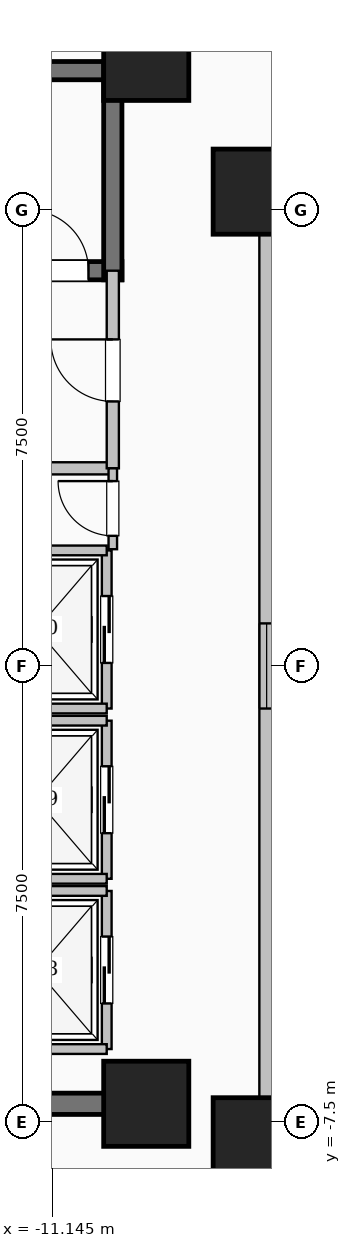
"""IFC4 building model, lengths in metres.
Left out: names, types, materials, properties, quantities, classifications, styles, units other than length and angle.
Written with IfcOpenShell. Run it as: python <this file> out.ifc"""

import sys

from ifc_helpers import new_model, si_unit, direction, frame, frame_2d, origin, origin_2d, place, context, subcontext, project, spatial, rectangle, extrude, element, fill, save


model = new_model("IFC4")
c1 = context("Model", 3, precision=1e-05, world=origin(), true_north=direction((0.0, 1.0)))
c2 = subcontext(c1, "Body", "Model", "MODEL_VIEW")
j1 = project(units=[si_unit("LENGTHUNIT", "METRE"), si_unit("PLANEANGLEUNIT", "RADIAN")], contexts=[c1])
p1 = place(None, origin())
s1 = spatial("IfcSite", under=j1, at=p1, CompositionType="ELEMENT")
p2 = place(p1, origin())
s2 = spatial("IfcBuilding", under=s1, at=p2, CompositionType="ELEMENT")
p3 = place(p2, frame((0.0, 0.0, 14.4)))
s3 = spatial("IfcBuildingStorey", under=s2, at=p3, CompositionType="ELEMENT", Elevation=14.4)
for number, where, z_axis, x_axis in (
    (1, (-7.8, -7.8, 0.0), (0.0, 0.0, 1.0), (1.0, 0.0, 0.0)),
    (2, (-7.8, 7.8, 0.0), (0.0, 0.0, 1.0), (1.0, 0.0, 0.0)),
    (3, (-9.6, -7.2, 0.0), (0.0, 0.0, 1.0), (1.0, 0.0, 0.0)),
    (4, (-9.6, 10.0, 0.0), (0.0, 0.0, 1.0), (1.0, 0.0, 0.0)),
):
    element("IfcColumn", number, at=place(p3, frame(where, z_axis=z_axis, x_axis=x_axis)), inside=s3, PredefinedType="COLUMN", context=c2, shape_type="SweptSolid", body=[
        extrude(rectangle(XDim=1.4, YDim=1.4, at=origin_2d()), origin(), (0.0, 0.0, 1.0), 4.5),
    ])
p4 = place(p3, frame((-7.62, -7.62, 0.0), z_axis=(0.0, 0.0, 1.0), x_axis=(1.0, 0.0, 0.0)))
e5 = element("IfcWall", 5, at=p4, inside=s3, PredefinedType="SOLIDWALL", context=c2, shape_type="SweptSolid", body=[
    extrude(rectangle(XDim=15.24, YDim=0.24, at=frame_2d((7.62, 0.0))), origin(), (0.0, 0.0, 1.0), 4.2),
])
p5 = place(p4, frame((6.92, 0.0, 0.95)))
e6 = element("IfcOpeningElement", 6, at=p5, cuts=e5, PredefinedType="OPENING", context=c2, shape_type="SweptSolid", body=[
    extrude(rectangle(XDim=1.4, YDim=1.5, at=frame_2d((0.7, 0.75))), frame((0.0, 0.13, 0.0), z_axis=(0.0, -1.0, 0.0), x_axis=(1.0, 0.0, 0.0)), (0.0, 0.0, 1.0), 0.26),
])
p6 = place(p3, frame((7.62, 7.62, 0.0), z_axis=(0.0, 0.0, 1.0), x_axis=(-1.0, 0.0, 0.0)))
e7 = element("IfcWall", 7, at=p6, inside=s3, PredefinedType="SOLIDWALL", context=c2, shape_type="SweptSolid", body=[
    extrude(rectangle(XDim=15.24, YDim=0.24, at=frame_2d((7.62, 0.0))), origin(), (0.0, 0.0, 1.0), 4.2),
])
p7 = place(p6, frame((6.92, 0.0, 0.95)))
e8 = element("IfcOpeningElement", 8, at=p7, cuts=e7, PredefinedType="OPENING", context=c2, shape_type="SweptSolid", body=[
    extrude(rectangle(XDim=1.4, YDim=1.5, at=frame_2d((0.7, 0.75))), frame((0.0, 0.13, 0.0), z_axis=(0.0, -1.0, 0.0), x_axis=(1.0, 0.0, 0.0)), (0.0, 0.0, 1.0), 0.26),
])
p8 = place(p3, frame((-7.62, 7.62, 0.0), z_axis=(0.0, 0.0, 1.0), x_axis=(0.0, -1.0, 0.0)))
e9 = element("IfcWall", 9, at=p8, inside=s3, PredefinedType="SOLIDWALL", context=c2, shape_type="SweptSolid", body=[
    extrude(rectangle(XDim=15.24, YDim=0.24, at=frame_2d((7.62, 0.0))), origin(), (0.0, 0.0, 1.0), 4.2),
])
p9 = place(p8, frame((6.92, 0.0, 0.95)))
e10 = element("IfcOpeningElement", 10, at=p9, cuts=e9, PredefinedType="OPENING", context=c2, shape_type="SweptSolid", body=[
    extrude(rectangle(XDim=1.4, YDim=1.5, at=frame_2d((0.7, 0.75))), frame((0.0, 0.13, 0.0), z_axis=(0.0, -1.0, 0.0), x_axis=(1.0, 0.0, 0.0)), (0.0, 0.0, 1.0), 0.26),
])
p10 = place(p3, frame((-18.0, 9.79, 0.0), z_axis=(0.0, 0.0, 1.0), x_axis=(1.0, 0.0, 0.0)))
e11 = element("IfcWall", 11, at=p10, inside=s3, PredefinedType="SHEAR", context=c2, shape_type="SweptSolid", body=[
    extrude(rectangle(XDim=8.0, YDim=0.3, at=frame_2d((4.0, 0.0))), origin(), (0.0, 0.0, 1.0), 4.5),
])
p11 = place(p3, frame((-18.0, 6.5, 0.0), z_axis=(0.0, 0.0, 1.0), x_axis=(1.0, 0.0, 0.0)))
e12 = element("IfcWall", 12, at=p11, inside=s3, PredefinedType="SHEAR", context=c2, shape_type="SweptSolid", body=[
    extrude(rectangle(XDim=8.0, YDim=0.3, at=frame_2d((4.0, 0.0))), origin(), (0.0, 0.0, 1.0), 4.5),
])
p12 = place(p11, frame((6.45, 0.0, 0.0)))
e13 = element("IfcOpeningElement", 13, at=p12, cuts=e12, PredefinedType="OPENING", context=c2, shape_type="SweptSolid", body=[
    extrude(rectangle(XDim=1.0, YDim=2.15, at=frame_2d((0.5, 1.075))), frame((0.0, 0.16, 0.0), z_axis=(0.0, -1.0, 0.0), x_axis=(1.0, 0.0, 0.0)), (0.0, 0.0, 1.0), 0.32),
])
p13 = place(p3, frame((-10.15, 6.35, 0.0), z_axis=(0.0, 0.0, 1.0), x_axis=(0.0, 1.0, 0.0)))
e14 = element("IfcWall", 14, at=p13, inside=s3, PredefinedType="SHEAR", context=c2, shape_type="SweptSolid", body=[
    extrude(rectangle(XDim=3.59, YDim=0.3, at=frame_2d((1.795, 0.0))), origin(), (0.0, 0.0, 1.0), 4.5),
])
p14 = place(p3, frame((-15.55, 3.25, 0.0), z_axis=(0.0, 0.0, 1.0), x_axis=(1.0, 0.0, 0.0)))
e15 = element("IfcWall", 15, at=p14, inside=s3, PredefinedType="SOLIDWALL", context=c2, shape_type="SweptSolid", body=[
    extrude(rectangle(XDim=5.4, YDim=0.2, at=frame_2d((2.7, 0.0))), origin(), (0.0, 0.0, 1.0), 4.2),
])
p15 = place(p3, frame((-10.15, 3.25, 0.0), z_axis=(0.0, 0.0, 1.0), x_axis=(0.0, 1.0, 0.0)))
e16 = element("IfcWall", 16, at=p15, inside=s3, PredefinedType="SOLIDWALL", context=c2, shape_type="SweptSolid", body=[
    extrude(rectangle(XDim=3.25, YDim=0.2, at=frame_2d((1.625, 0.0))), origin(), (0.0, 0.0, 1.0), 4.2),
])
p16 = place(p15, frame((1.1, 0.0, 0.0)))
e17 = element("IfcOpeningElement", 17, at=p16, cuts=e16, PredefinedType="OPENING", context=c2, shape_type="SweptSolid", body=[
    extrude(rectangle(XDim=1.02, YDim=2.15, at=frame_2d((0.51, 1.075))), frame((0.0, 0.11, 0.0), z_axis=(0.0, -1.0, 0.0), x_axis=(1.0, 0.0, 0.0)), (0.0, 0.0, 1.0), 0.22),
])
p17 = place(p3, frame((-10.25, -6.3, 0.0), z_axis=(0.0, 0.0, 1.0), x_axis=(0.0, 1.0, 0.0)))
e18 = element("IfcWall", 18, at=p17, inside=s3, PredefinedType="SOLIDWALL", context=c2, shape_type="SweptSolid", body=[
    extrude(rectangle(XDim=2.6, YDim=0.16, at=frame_2d((1.3, 0.0))), origin(), (0.0, 0.0, 1.0), 4.2),
])
p18 = place(p17, frame((0.75, 0.0, 0.0)))
e19 = element("IfcOpeningElement", 19, at=p18, cuts=e18, PredefinedType="OPENING", context=c2, shape_type="SweptSolid", body=[
    extrude(rectangle(XDim=1.1, YDim=2.15, at=frame_2d((0.55, 1.075))), frame((0.0, 0.09, 0.0), z_axis=(0.0, -1.0, 0.0), x_axis=(1.0, 0.0, 0.0)), (0.0, 0.0, 1.0), 0.18),
])
for number, where, z_axis, x_axis in (
    (20, (-12.55, -6.3, 0.0), (0.0, 0.0, 1.0), (1.0, 0.0, 0.0)),
    (21, (-12.55, -3.7, 0.0), (0.0, 0.0, 1.0), (1.0, 0.0, 0.0)),
):
    element("IfcWall", number, at=place(p3, frame(where, z_axis=z_axis, x_axis=x_axis)), inside=s3, PredefinedType="SOLIDWALL", context=c2, shape_type="SweptSolid", body=[
        extrude(rectangle(XDim=2.3, YDim=0.16, at=frame_2d((1.15, 0.0))), origin(), (0.0, 0.0, 1.0), 4.2),
    ])
p19 = place(p3, frame((-10.25, -3.5, 0.0), z_axis=(0.0, 0.0, 1.0), x_axis=(0.0, 1.0, 0.0)))
e22 = element("IfcWall", 22, at=p19, inside=s3, PredefinedType="SOLIDWALL", context=c2, shape_type="SweptSolid", body=[
    extrude(rectangle(XDim=2.6, YDim=0.16, at=frame_2d((1.3, 0.0))), origin(), (0.0, 0.0, 1.0), 4.2),
])
p20 = place(p19, frame((0.75, 0.0, 0.0)))
e23 = element("IfcOpeningElement", 23, at=p20, cuts=e22, PredefinedType="OPENING", context=c2, shape_type="SweptSolid", body=[
    extrude(rectangle(XDim=1.1, YDim=2.15, at=frame_2d((0.55, 1.075))), frame((0.0, 0.09, 0.0), z_axis=(0.0, -1.0, 0.0), x_axis=(1.0, 0.0, 0.0)), (0.0, 0.0, 1.0), 0.18),
])
for number, where, z_axis, x_axis in (
    (24, (-12.55, -3.5, 0.0), (0.0, 0.0, 1.0), (1.0, 0.0, 0.0)),
    (25, (-12.55, -0.9, 0.0), (0.0, 0.0, 1.0), (1.0, 0.0, 0.0)),
):
    element("IfcWall", number, at=place(p3, frame(where, z_axis=z_axis, x_axis=x_axis)), inside=s3, PredefinedType="SOLIDWALL", context=c2, shape_type="SweptSolid", body=[
        extrude(rectangle(XDim=2.3, YDim=0.16, at=frame_2d((1.15, 0.0))), origin(), (0.0, 0.0, 1.0), 4.2),
    ])
p21 = place(p3, frame((-10.25, -0.7, 0.0), z_axis=(0.0, 0.0, 1.0), x_axis=(0.0, 1.0, 0.0)))
e26 = element("IfcWall", 26, at=p21, inside=s3, PredefinedType="SOLIDWALL", context=c2, shape_type="SweptSolid", body=[
    extrude(rectangle(XDim=2.6, YDim=0.16, at=frame_2d((1.3, 0.0))), origin(), (0.0, 0.0, 1.0), 4.2),
])
p22 = place(p21, frame((0.75, 0.0, 0.0)))
e27 = element("IfcOpeningElement", 27, at=p22, cuts=e26, PredefinedType="OPENING", context=c2, shape_type="SweptSolid", body=[
    extrude(rectangle(XDim=1.1, YDim=2.15, at=frame_2d((0.55, 1.075))), frame((0.0, 0.09, 0.0), z_axis=(0.0, -1.0, 0.0), x_axis=(1.0, 0.0, 0.0)), (0.0, 0.0, 1.0), 0.18),
])
for number, where, z_axis, x_axis in (
    (28, (-12.55, -0.7, 0.0), (0.0, 0.0, 1.0), (1.0, 0.0, 0.0)),
    (29, (-12.55, 1.9, 0.0), (0.0, 0.0, 1.0), (1.0, 0.0, 0.0)),
):
    element("IfcWall", number, at=place(p3, frame(where, z_axis=z_axis, x_axis=x_axis)), inside=s3, PredefinedType="SOLIDWALL", context=c2, shape_type="SweptSolid", body=[
        extrude(rectangle(XDim=2.3, YDim=0.16, at=frame_2d((1.15, 0.0))), origin(), (0.0, 0.0, 1.0), 4.2),
    ])
p23 = place(p3, frame((-18.625, -7.2, 0.0), z_axis=(0.0, 0.0, 1.0), x_axis=(1.0, 0.0, 0.0)))
e30 = element("IfcWall", 30, at=p23, inside=s3, PredefinedType="SHEAR", context=c2, shape_type="SweptSolid", body=[
    extrude(rectangle(XDim=8.55, YDim=0.35, at=frame_2d((4.275, 0.0))), origin(), (0.0, 0.0, 1.0), 4.5),
])
p24 = place(p3, frame((-10.15, 1.92, 0.0), z_axis=(0.0, 0.0, 1.0), x_axis=(0.0, 1.0, 0.0)))
e31 = element("IfcWall", 31, at=p24, inside=s3, PredefinedType="PARTITIONING", context=c2, shape_type="SweptSolid", body=[
    extrude(rectangle(XDim=1.33, YDim=0.14, at=frame_2d((0.665, 0.0))), origin(), (0.0, 0.0, 1.0), 4.2),
])
p25 = place(p24, frame((0.22, 0.0, 0.0)))
e32 = element("IfcOpeningElement", 32, at=p25, cuts=e31, PredefinedType="OPENING", context=c2, shape_type="SweptSolid", body=[
    extrude(rectangle(XDim=0.9, YDim=2.08, at=frame_2d((0.45, 1.04))), frame((0.0, 0.08, 0.0), z_axis=(0.0, -1.0, 0.0), x_axis=(1.0, 0.0, 0.0)), (0.0, 0.0, 1.0), 0.16),
])
p26 = place(p9, origin())
e33 = element("IfcWindow", 33, at=p26, inside=s3, PartitioningType="SINGLE_PANEL", PredefinedType="WINDOW", context=c2, shape_type="SweptSolid", body=[
    extrude(rectangle(XDim=1.4, YDim=1.5, at=frame_2d((0.7, 0.75))), frame((0.0, 0.03, 0.0), z_axis=(0.0, -1.0, 0.0), x_axis=(1.0, 0.0, 0.0)), (0.0, 0.0, 1.0), 0.06),
])
fill(e10, e33)
p27 = place(p12, origin())
e34 = element("IfcDoor", 34, at=p27, inside=s3, OperationType="SINGLE_SWING_LEFT", PredefinedType="DOOR", context=c2, shape_type="SweptSolid", body=[
    extrude(rectangle(XDim=1.0, YDim=2.15, at=frame_2d((0.5, 1.075))), frame((0.0, 0.025, 0.0), z_axis=(0.0, -1.0, 0.0), x_axis=(1.0, 0.0, 0.0)), (0.0, 0.0, 1.0), 0.05),
])
fill(e13, e34)
p28 = place(p16, origin())
e35 = element("IfcDoor", 35, at=p28, inside=s3, OperationType="SINGLE_SWING_RIGHT", PredefinedType="DOOR", context=c2, shape_type="SweptSolid", body=[
    extrude(rectangle(XDim=1.02, YDim=2.15, at=frame_2d((0.51, 1.075))), frame((0.0, 0.025, 0.0), z_axis=(0.0, -1.0, 0.0), x_axis=(1.0, 0.0, 0.0)), (0.0, 0.0, 1.0), 0.05),
])
fill(e17, e35)
p29 = place(p18, origin())
e36 = element("IfcDoor", 36, at=p29, inside=s3, OperationType="SLIDING_TO_LEFT", PredefinedType="DOOR", context=c2, shape_type="SweptSolid", body=[
    extrude(rectangle(XDim=1.1, YDim=2.15, at=frame_2d((0.55, 1.075))), frame((0.0, 0.025, 0.0), z_axis=(0.0, -1.0, 0.0), x_axis=(1.0, 0.0, 0.0)), (0.0, 0.0, 1.0), 0.05),
])
fill(e19, e36)
p30 = place(p20, origin())
e37 = element("IfcDoor", 37, at=p30, inside=s3, OperationType="SLIDING_TO_LEFT", PredefinedType="DOOR", context=c2, shape_type="SweptSolid", body=[
    extrude(rectangle(XDim=1.1, YDim=2.15, at=frame_2d((0.55, 1.075))), frame((0.0, 0.025, 0.0), z_axis=(0.0, -1.0, 0.0), x_axis=(1.0, 0.0, 0.0)), (0.0, 0.0, 1.0), 0.05),
])
fill(e23, e37)
p31 = place(p22, origin())
e38 = element("IfcDoor", 38, at=p31, inside=s3, OperationType="SLIDING_TO_LEFT", PredefinedType="DOOR", context=c2, shape_type="SweptSolid", body=[
    extrude(rectangle(XDim=1.1, YDim=2.15, at=frame_2d((0.55, 1.075))), frame((0.0, 0.025, 0.0), z_axis=(0.0, -1.0, 0.0), x_axis=(1.0, 0.0, 0.0)), (0.0, 0.0, 1.0), 0.05),
])
fill(e27, e38)
p32 = place(p25, origin())
e39 = element("IfcDoor", 39, at=p32, inside=s3, OperationType="SINGLE_SWING_RIGHT", PredefinedType="DOOR", context=c2, shape_type="SweptSolid", body=[
    extrude(rectangle(XDim=0.9, YDim=2.08, at=frame_2d((0.45, 1.04))), frame((0.0, 0.025, 0.0), z_axis=(0.0, -1.0, 0.0), x_axis=(1.0, 0.0, 0.0)), (0.0, 0.0, 1.0), 0.05),
])
fill(e32, e39)
save(model, sys.argv[1])
